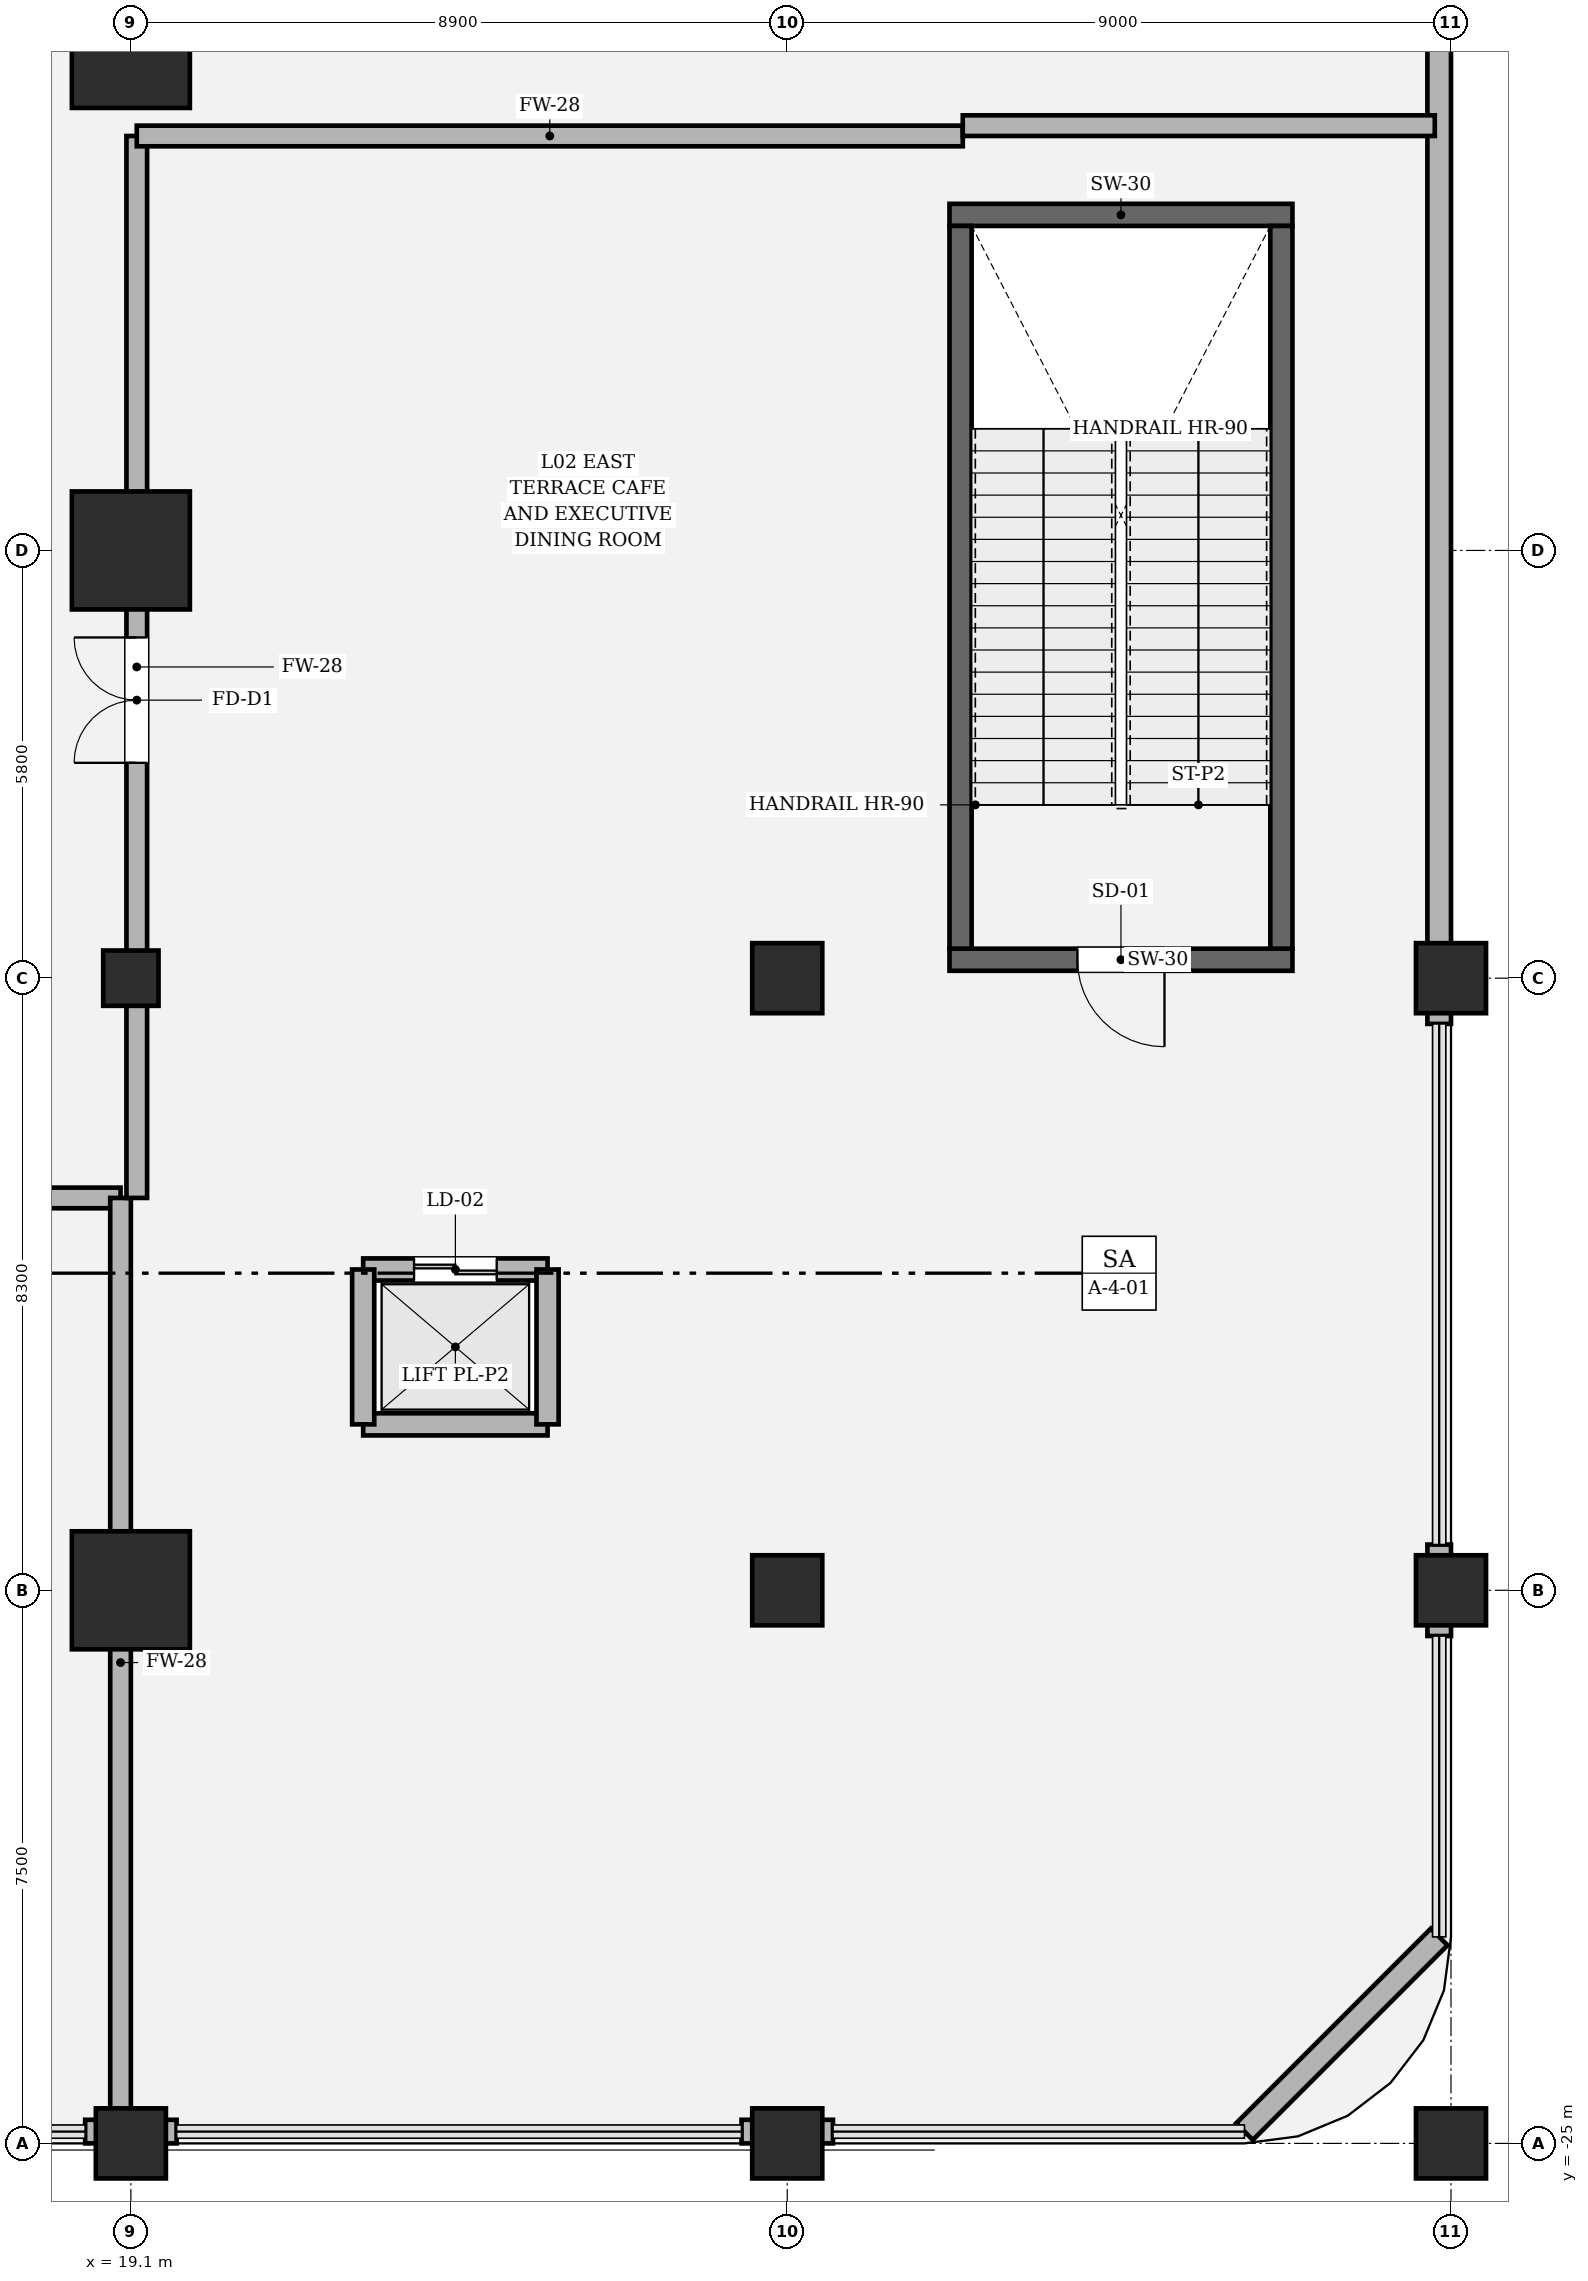
"""IFC4 building model, lengths in metres.
Left out: names, types, materials, properties, quantities, classifications, styles, units other than length and angle.
Written with IfcOpenShell. Run it as: python <this file> out.ifc"""

import sys

from ifc_helpers import new_model, si_unit, direction, frame, frame_2d, origin, origin_2d, place, context, subcontext, project, spatial, rectangle, hollow_rectangle, circle, extrude, element, fill, save


model = new_model("IFC4")
c1 = context("Model", 3, precision=1e-05, world=origin(), true_north=direction((0.0, 1.0)))
c2 = subcontext(c1, "Body", "Model", "MODEL_VIEW")
j1 = project(units=[si_unit("LENGTHUNIT", "METRE"), si_unit("PLANEANGLEUNIT", "RADIAN")], contexts=[c1])
p1 = place(None, origin())
s1 = spatial("IfcSite", under=j1, at=p1, CompositionType="ELEMENT")
p2 = place(p1, origin())
s2 = spatial("IfcBuilding", under=s1, at=p2, CompositionType="ELEMENT")
p3 = place(p2, frame((0.0, 0.0, 11.4)))
s3 = spatial("IfcBuildingStorey", under=s2, at=p3, CompositionType="ELEMENT", Elevation=11.4)
p4 = place(p3, frame((30.2, -8.95, 0.0), z_axis=(0.0, 0.0, 1.0), x_axis=(1.0, 0.0, 0.0)))
e1 = element("IfcWall", 1, at=p4, inside=s3, PredefinedType="SOLIDWALL", context=c2, shape_type="SweptSolid", body=[
    extrude(rectangle(XDim=4.65, YDim=0.3, at=frame_2d((2.325, 0.0))), origin(), (0.0, 0.0, 1.0), 5.4),
])
p5 = place(p4, frame((1.735, 0.0, 0.0)))
e2 = element("IfcOpeningElement", 2, at=p5, cuts=e1, PredefinedType="OPENING", context=c2, shape_type="SweptSolid", body=[
    extrude(rectangle(XDim=1.18, YDim=2.2, at=frame_2d((0.59, 1.1))), frame((0.0, 0.16, 0.0), z_axis=(0.0, -1.0, 0.0), x_axis=(1.0, 0.0, 0.0)), (0.0, 0.0, 1.0), 0.32),
])
p6 = place(p3, frame((34.85, 1.15, 0.0), z_axis=(0.0, 0.0, 1.0), x_axis=(-1.0, 0.0, 0.0)))
e3 = element("IfcWall", 3, at=p6, inside=s3, PredefinedType="SOLIDWALL", context=c2, shape_type="SweptSolid", body=[
    extrude(rectangle(XDim=4.65, YDim=0.3, at=frame_2d((2.325, 0.0))), origin(), (0.0, 0.0, 1.0), 5.4),
])
for number, where, z_axis, x_axis in (
    (4, (30.35, -8.8, 0.0), (0.0, 0.0, 1.0), (0.0, 1.0, 0.0)),
    (5, (34.7, 1.0, 0.0), (0.0, 0.0, 1.0), (0.0, -1.0, 0.0)),
):
    element("IfcWall", number, at=place(p3, frame(where, z_axis=z_axis, x_axis=x_axis)), inside=s3, PredefinedType="SOLIDWALL", context=c2, shape_type="SweptSolid", body=[
        extrude(rectangle(XDim=9.8, YDim=0.3, at=frame_2d((4.9, 0.0))), origin(), (0.0, 0.0, 1.0), 5.4),
    ])
for number, where, z_axis, x_axis in (
    (6, (19.1, -17.5, 0.0), (0.0, 0.0, 1.0), (1.0, 0.0, 0.0)),
    (7, (19.1, -3.4, 0.0), (0.0, 0.0, 1.0), (1.0, 0.0, 0.0)),
    (8, (19.1, 3.4, 0.0), (0.0, 0.0, 1.0), (1.0, 0.0, 0.0)),
):
    element("IfcColumn", number, at=place(p3, frame(where, z_axis=z_axis, x_axis=x_axis)), inside=s3, PredefinedType="COLUMN", context=c2, shape_type="SweptSolid", body=[
        extrude(hollow_rectangle(XDim=1.6, YDim=1.6, WallThickness=0.05, at=origin_2d()), origin(), (0.0, 0.0, 1.0), 5.4),
    ])
for number, where, z_axis, x_axis in (
    (9, (19.1, -25.0, 0.0), (0.0, 0.0, 1.0), (1.0, 0.0, 0.0)),
    (10, (28.0, -25.0, 0.0), (0.0, 0.0, 1.0), (1.0, 0.0, 0.0)),
    (11, (37.0, -25.0, 0.0), (0.0, 0.0, 1.0), (1.0, 0.0, 0.0)),
    (12, (28.0, -17.5, 0.0), (0.0, 0.0, 1.0), (1.0, 0.0, 0.0)),
    (13, (37.0, -17.5, 0.0), (0.0, 0.0, 1.0), (1.0, 0.0, 0.0)),
    (14, (37.0, -9.2, 0.0), (0.0, 0.0, 1.0), (1.0, 0.0, 0.0)),
    (15, (28.0, -9.2, 0.0), (0.0, 0.0, 1.0), (1.0, 0.0, 0.0)),
):
    element("IfcColumn", number, at=place(p3, frame(where, z_axis=z_axis, x_axis=x_axis)), inside=s3, PredefinedType="COLUMN", context=c2, shape_type="SweptSolid", body=[
        extrude(rectangle(XDim=0.95, YDim=0.95, at=origin_2d()), origin(), (0.0, 0.0, 1.0), 5.4),
    ])
p7 = place(p3, frame((19.1, -9.2, 0.0), z_axis=(0.0, 0.0, 1.0), x_axis=(1.0, 0.0, 0.0)))
e16 = element("IfcColumn", 16, at=p7, inside=s3, PredefinedType="PILASTER", context=c2, shape_type="SweptSolid", body=[
    extrude(circle(Radius=0.375, at=origin_2d()), origin(), (0.0, 0.0, 1.0), 5.4),
])
p8 = place(p3, frame((18.48, -24.84, 0.0), z_axis=(0.0, 0.0, 1.0), x_axis=(1.0, 0.0, 0.0)))
e17 = element("IfcWall", 17, at=p8, inside=s3, PredefinedType="SOLIDWALL", context=c2, shape_type="SweptSolid", body=[
    extrude(rectangle(XDim=1.24, YDim=0.32, at=frame_2d((0.62, 0.0))), origin(), (0.0, 0.0, 1.0), 4.414),
])
p9 = place(p3, frame((27.38, -24.84, 0.0), z_axis=(0.0, 0.0, 1.0), x_axis=(1.0, 0.0, 0.0)))
e18 = element("IfcWall", 18, at=p9, inside=s3, PredefinedType="SOLIDWALL", context=c2, shape_type="SweptSolid", body=[
    extrude(rectangle(XDim=1.24, YDim=0.32, at=frame_2d((0.62, 0.0))), origin(), (0.0, 0.0, 1.0), 4.414),
])
p10 = place(p3, frame((36.84, 9.82, 0.0), z_axis=(0.0, 0.0, 1.0), x_axis=(0.0, -1.0, 0.0)))
e19 = element("IfcWall", 19, at=p10, inside=s3, PredefinedType="SOLIDWALL", context=c2, shape_type="SweptSolid", body=[
    extrude(rectangle(XDim=19.64, YDim=0.32, at=frame_2d((9.82, 0.0))), origin(), (0.0, 0.0, 1.0), 4.414),
])
p11 = place(p3, frame((36.84, -16.88, 0.0), z_axis=(0.0, 0.0, 1.0), x_axis=(0.0, -1.0, 0.0)))
e20 = element("IfcWall", 20, at=p11, inside=s3, PredefinedType="SOLIDWALL", context=c2, shape_type="SweptSolid", body=[
    extrude(rectangle(XDim=1.24, YDim=0.32, at=frame_2d((0.62, 0.0))), origin(), (0.0, 0.0, 1.0), 4.414),
])
p12 = place(p3, frame((36.84, -22.2, 0.0), z_axis=(0.0, 0.0, 1.0), x_axis=(-0.707106781187, -0.707106781187, 0.0)))
e21 = element("IfcWall", 21, at=p12, inside=s3, PredefinedType="SOLIDWALL", context=c2, shape_type="SweptSolid", body=[
    extrude(rectangle(XDim=3.734, YDim=0.32, at=frame_2d((1.867, 0.0))), origin(), (0.0, 0.0, 1.0), 4.564),
])
p13 = place(p3, frame((22.25, -13.15, 0.0), z_axis=(0.0, 0.0, 1.0), x_axis=(1.0, 0.0, 0.0)))
e22 = element("IfcWall", 22, at=p13, inside=s3, PredefinedType="SOLIDWALL", context=c2, shape_type="SweptSolid", body=[
    extrude(rectangle(XDim=2.5, YDim=0.3, at=frame_2d((1.25, 0.0))), origin(), (0.0, 0.0, 1.0), 5.12),
])
p14 = place(p13, frame((0.69, 0.0, 0.0)))
e23 = element("IfcOpeningElement", 23, at=p14, cuts=e22, PredefinedType="OPENING", context=c2, shape_type="SweptSolid", body=[
    extrude(rectangle(XDim=1.12, YDim=2.25, at=frame_2d((0.56, 1.125))), frame((0.0, 0.16, 0.0), z_axis=(0.0, -1.0, 0.0), x_axis=(1.0, 0.0, 0.0)), (0.0, 0.0, 1.0), 0.32),
])
p15 = place(p3, frame((22.25, -15.25, 0.0), z_axis=(0.0, 0.0, 1.0), x_axis=(1.0, 0.0, 0.0)))
e24 = element("IfcWall", 24, at=p15, inside=s3, PredefinedType="SOLIDWALL", context=c2, shape_type="SweptSolid", body=[
    extrude(rectangle(XDim=2.5, YDim=0.3, at=frame_2d((1.25, 0.0))), origin(), (0.0, 0.0, 1.0), 5.12),
])
for number, where, z_axis, x_axis in (
    (25, (22.25, -15.25, 0.0), (0.0, 0.0, 1.0), (0.0, 1.0, 0.0)),
    (26, (24.75, -15.25, 0.0), (0.0, 0.0, 1.0), (0.0, 1.0, 0.0)),
):
    element("IfcWall", number, at=place(p3, frame(where, z_axis=z_axis, x_axis=x_axis)), inside=s3, PredefinedType="SOLIDWALL", context=c2, shape_type="SweptSolid", body=[
        extrude(rectangle(XDim=2.1, YDim=0.3, at=frame_2d((1.05, 0.0))), origin(), (0.0, 0.0, 1.0), 5.12),
    ])
p16 = place(p3, frame((-11.34, -12.18, 0.0), z_axis=(0.0, 0.0, 1.0), x_axis=(1.0, 0.0, 0.0)))
e27 = element("IfcWall", 27, at=p16, inside=s3, PredefinedType="SOLIDWALL", context=c2, shape_type="SweptSolid", body=[
    extrude(rectangle(XDim=30.3, YDim=0.28, at=frame_2d((15.15, 0.0))), origin(), (0.0, 0.0, 1.0), 4.414),
])
p17 = place(p16, frame((14.3, 0.0, 0.0)))
e28 = element("IfcOpeningElement", 28, at=p17, cuts=e27, PredefinedType="OPENING", context=c2, shape_type="SweptSolid", body=[
    extrude(rectangle(XDim=1.7, YDim=2.3, at=frame_2d((0.85, 1.15))), frame((0.0, 0.15, 0.0), z_axis=(0.0, -1.0, 0.0), x_axis=(1.0, 0.0, 0.0)), (0.0, 0.0, 1.0), 0.3),
])
p18 = place(p3, frame((18.96, -12.18, 0.0), z_axis=(0.0, 0.0, 1.0), x_axis=(0.0, -1.0, 0.0)))
e29 = element("IfcWall", 29, at=p18, inside=s3, PredefinedType="SOLIDWALL", context=c2, shape_type="SweptSolid", body=[
    extrude(rectangle(XDim=12.6, YDim=0.28, at=frame_2d((6.3, 0.0))), origin(), (0.0, 0.0, 1.0), 4.414),
])
p19 = place(p3, frame((19.18, -12.18, 0.0), z_axis=(0.0, 0.0, 1.0), x_axis=(0.0, 1.0, 0.0)))
e30 = element("IfcWall", 30, at=p19, inside=s3, PredefinedType="SOLIDWALL", context=c2, shape_type="SweptSolid", body=[
    extrude(rectangle(XDim=14.4, YDim=0.28, at=frame_2d((7.2, 0.0))), origin(), (0.0, 0.0, 1.0), 4.414),
])
p20 = place(p19, frame((5.9, 0.0, 0.0)))
e31 = element("IfcOpeningElement", 31, at=p20, cuts=e30, PredefinedType="OPENING", context=c2, shape_type="SweptSolid", body=[
    extrude(rectangle(XDim=1.7, YDim=2.3, at=frame_2d((0.85, 1.15))), frame((0.0, 0.15, 0.0), z_axis=(0.0, -1.0, 0.0), x_axis=(1.0, 0.0, 0.0)), (0.0, 0.0, 1.0), 0.3),
])
p21 = place(p3, frame((19.18, 2.22, 0.0), z_axis=(0.0, 0.0, 1.0), x_axis=(1.0, 0.0, 0.0)))
e32 = element("IfcWall", 32, at=p21, inside=s3, PredefinedType="SOLIDWALL", context=c2, shape_type="SweptSolid", body=[
    extrude(rectangle(XDim=11.2, YDim=0.28, at=frame_2d((5.6, 0.0))), origin(), (0.0, 0.0, 1.0), 4.414),
])
p22 = place(p3, frame((30.38, 2.36, 0.0), z_axis=(0.0, 0.0, 1.0), x_axis=(1.0, 0.0, 0.0)))
e33 = element("IfcWall", 33, at=p22, inside=s3, PredefinedType="SOLIDWALL", context=c2, shape_type="SweptSolid", body=[
    extrude(rectangle(XDim=6.4, YDim=0.28, at=frame_2d((3.2, 0.0))), origin(), (0.0, 0.0, 1.0), 5.12),
])
p23 = place(p5, origin())
e34 = element("IfcDoor", 34, at=p23, inside=s3, OperationType="SINGLE_SWING_RIGHT", PredefinedType="DOOR", context=c2, shape_type="SweptSolid", body=[
    extrude(rectangle(XDim=1.18, YDim=2.2, at=frame_2d((0.59, 1.1))), frame((0.0, 0.025, 0.0), z_axis=(0.0, -1.0, 0.0), x_axis=(1.0, 0.0, 0.0)), (0.0, 0.0, 1.0), 0.05),
])
fill(e2, e34)
p24 = place(p14, origin())
e35 = element("IfcDoor", 35, at=p24, inside=s3, OperationType="DOUBLE_DOOR_SLIDING", PredefinedType="DOOR", context=c2, shape_type="SweptSolid", body=[
    extrude(rectangle(XDim=1.12, YDim=2.25, at=frame_2d((0.56, 1.125))), frame((0.0, 0.025, 0.0), z_axis=(0.0, -1.0, 0.0), x_axis=(1.0, 0.0, 0.0)), (0.0, 0.0, 1.0), 0.05),
])
fill(e23, e35)
p25 = place(p20, origin())
e36 = element("IfcDoor", 36, at=p25, inside=s3, OperationType="DOUBLE_DOOR_SINGLE_SWING", PredefinedType="DOOR", context=c2, shape_type="SweptSolid", body=[
    extrude(rectangle(XDim=1.7, YDim=2.3, at=frame_2d((0.85, 1.15))), frame((0.0, 0.025, 0.0), z_axis=(0.0, -1.0, 0.0), x_axis=(1.0, 0.0, 0.0)), (0.0, 0.0, 1.0), 0.05),
])
fill(e31, e36)
save(model, sys.argv[1])
